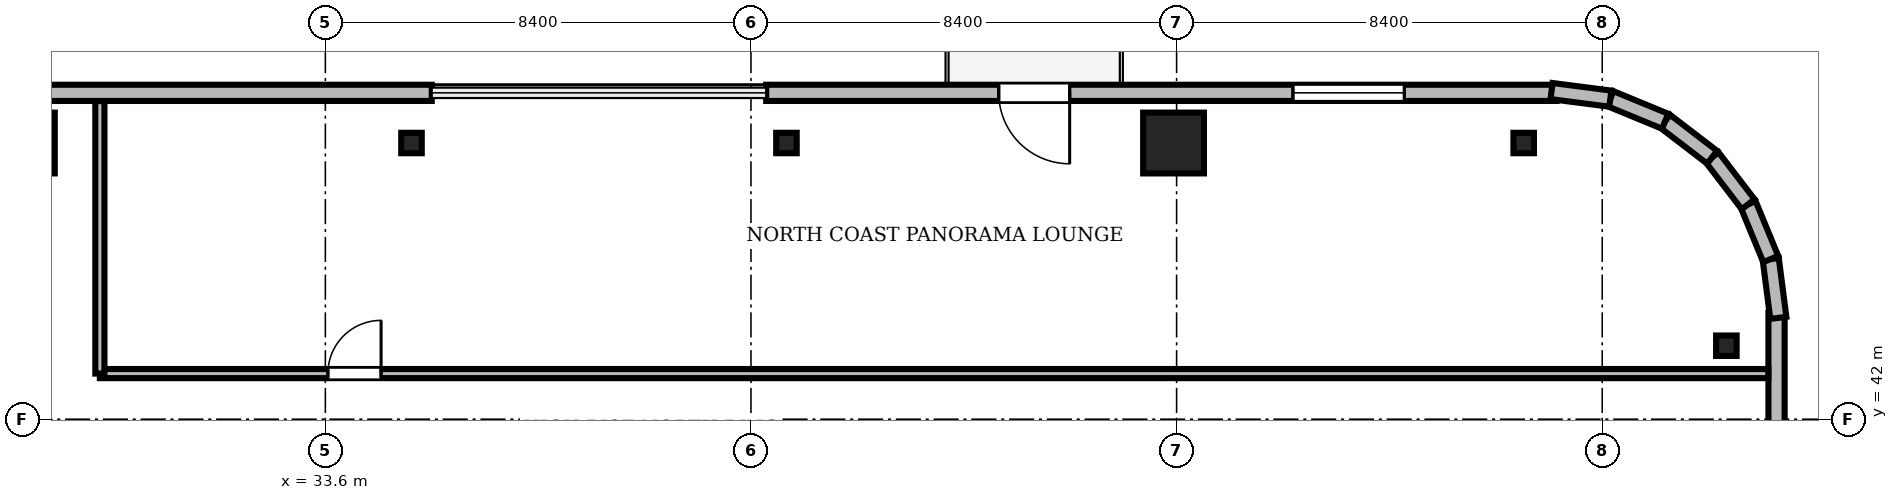
"""IFC4 building model, lengths in metres.
Left out: names, types, materials, properties, quantities, classifications, styles, units other than length and angle.
Written with IfcOpenShell. Run it as: python <this file> out.ifc"""

import sys

from ifc_helpers import new_model, si_unit, direction, frame, frame_2d, origin, origin_2d, place, context, subcontext, project, spatial, rectangle, i_section, extrude, source, transform, mapped, element, fill, save


model = new_model("IFC4")
c1 = context("Model", 3, precision=1e-05, world=origin(), true_north=direction((0.0, 1.0)))
c2 = subcontext(c1, "Body", "Model", "MODEL_VIEW")
j1 = project(units=[si_unit("LENGTHUNIT", "METRE"), si_unit("PLANEANGLEUNIT", "RADIAN")], contexts=[c1])
p1 = place(None, origin())
s1 = spatial("IfcSite", under=j1, at=p1, CompositionType="ELEMENT")
p2 = place(p1, origin())
s2 = spatial("IfcBuilding", under=s1, at=p2, CompositionType="ELEMENT")
p3 = place(p2, frame((0.0, 0.0, 246.65)))
s3 = spatial("IfcBuildingStorey", under=s2, at=p3, CompositionType="ELEMENT", Elevation=246.65)
m1 = source(origin(), c2, "Body", "SweptSolid", [
    extrude(rectangle(XDim=1.2, YDim=1.2, at=origin_2d()), origin(), (0.0, 0.0, 1.0), 3.73),
])
for number, where, z_axis, x_axis in (
    (1, (50.34, 47.45, 0.0), (0.0, 0.0, 1.0), (1.0, 0.0, 0.0)),
    (2, (27.66, 47.45, 0.0), (0.0, 0.0, 1.0), (1.0, 0.0, 0.0)),
):
    element("IfcColumn", number, at=place(p3, frame(where, z_axis=z_axis, x_axis=x_axis)), inside=s3, PredefinedType="COLUMN", context=c2, shape_type="MappedRepresentation", body=[
        mapped(m1, transform((0.0, 0.0, 0.0), scale=1.0)),
    ])
m2 = source(origin(), c2, "Body", "SweptSolid", [
    extrude(i_section(OverallWidth=0.405, OverallDepth=0.403, WebThickness=0.018, FlangeThickness=0.028, FilletRadius=0.015, at=origin_2d()), origin(), (0.0, 0.0, 1.0), 3.73),
])
for number, where, z_axis, x_axis in (
    (3, (61.25, 43.45, 0.0), (0.0, 0.0, 1.0), (1.0, 0.0, 0.0)),
    (4, (57.25, 47.45, 0.0), (0.0, 0.0, 1.0), (1.0, 0.0, 0.0)),
    (5, (42.7, 47.45, 0.0), (0.0, 0.0, 1.0), (1.0, 0.0, 0.0)),
    (6, (35.3, 47.45, 0.0), (0.0, 0.0, 1.0), (1.0, 0.0, 0.0)),
):
    element("IfcColumn", number, at=place(p3, frame(where, z_axis=z_axis, x_axis=x_axis)), inside=s3, PredefinedType="COLUMN", context=c2, shape_type="MappedRepresentation", body=[
        mapped(m2, transform((0.0, 0.0, 0.0), scale=1.0)),
    ])
m3 = source(origin(), c2, "Body", "SweptSolid", [
    extrude(rectangle(XDim=15.6, YDim=0.32, at=frame_2d((7.8, 0.0))), origin(), (0.0, 0.0, 1.0), 3.73),
])
p4 = place(p3, frame((57.9, 48.44, 0.0), z_axis=(0.0, 0.0, 1.0), x_axis=(-1.0, 0.0, 0.0)))
e7 = element("IfcWall", 7, at=p4, inside=s3, PredefinedType="SOLIDWALL", context=c2, shape_type="MappedRepresentation", body=[
    mapped(m3, transform((0.0, 0.0, 0.0), scale=1.0)),
])
m4 = source(origin(), c2, "Body", "SweptSolid", [
    extrude(rectangle(XDim=1.4, YDim=2.3, at=frame_2d((0.7, 1.15))), frame((0.0, 0.17, 0.0), z_axis=(0.0, -1.0, 0.0), x_axis=(1.0, 0.0, 0.0)), (0.0, 0.0, 1.0), 0.34),
])
p5 = place(p4, frame((9.61, 0.0, 0.0)))
e8 = element("IfcOpeningElement", 8, at=p5, cuts=e7, PredefinedType="OPENING", context=c2, shape_type="MappedRepresentation", body=[
    mapped(m4, transform((0.0, 0.0, 0.0), scale=1.0)),
])
m5 = source(origin(), c2, "Body", "SweptSolid", [
    extrude(rectangle(XDim=2.2, YDim=2.4, at=frame_2d((1.1, 1.2))), frame((0.0, 0.17, 0.0), z_axis=(0.0, -1.0, 0.0), x_axis=(1.0, 0.0, 0.0)), (0.0, 0.0, 1.0), 0.34),
])
p6 = place(p4, frame((3.005, 0.0, 0.72)))
e9 = element("IfcOpeningElement", 9, at=p6, cuts=e7, PredefinedType="OPENING", context=c2, shape_type="MappedRepresentation", body=[
    mapped(m5, transform((0.0, 0.0, 0.0), scale=1.0)),
])
p7 = place(p3, frame((35.7, 48.44, 0.0), z_axis=(0.0, 0.0, 1.0), x_axis=(-1.0, 0.0, 0.0)))
e10 = element("IfcWall", 10, at=p7, inside=s3, PredefinedType="SOLIDWALL", context=c2, shape_type="MappedRepresentation", body=[
    mapped(m3, transform((0.0, 0.0, 0.0), scale=1.0)),
])
p8 = place(p7, frame((10.395, 0.0, 0.72)))
e11 = element("IfcOpeningElement", 11, at=p8, cuts=e10, PredefinedType="OPENING", context=c2, shape_type="MappedRepresentation", body=[
    mapped(m5, transform((0.0, 0.0, 0.0), scale=1.0)),
])
m6 = source(origin(), c2, "Body", "SweptSolid", [
    extrude(rectangle(XDim=15.6, YDim=0.32, at=frame_2d((7.8, 0.0))), origin(), (0.0, 0.0, 1.0), 3.73),
])
p9 = place(p3, frame((62.24, 28.5, 0.0), z_axis=(0.0, 0.0, 1.0), x_axis=(0.0, 1.0, 0.0)))
e12 = element("IfcWall", 12, at=p9, inside=s3, PredefinedType="SOLIDWALL", context=c2, shape_type="MappedRepresentation", body=[
    mapped(m6, transform((0.0, 0.0, 0.0), scale=1.0)),
])
p10 = place(p9, frame((10.395, 0.0, 0.72)))
e13 = element("IfcOpeningElement", 13, at=p10, cuts=e12, PredefinedType="OPENING", context=c2, shape_type="MappedRepresentation", body=[
    mapped(m5, transform((0.0, 0.0, 0.0), scale=1.0)),
])
m7 = source(origin(), c2, "Body", "SweptSolid", [
    extrude(rectangle(XDim=1.17, YDim=0.32, at=frame_2d((0.585, 0.0))), origin(), (0.0, 0.0, 1.0), 3.73),
])
p11 = place(p3, frame((62.276, 44.0, 0.0), z_axis=(0.0, 0.0, 1.0), x_axis=(-0.128295670475, 0.991735963317, 0.0)))
e14 = element("IfcWall", 14, at=p11, inside=s3, PredefinedType="SOLIDWALL", context=c2, shape_type="MappedRepresentation", body=[
    mapped(m7, transform((0.0, 0.0, 0.0), scale=1.0)),
])
m8 = source(origin(), c2, "Body", "SweptSolid", [
    extrude(rectangle(XDim=1.169, YDim=0.32, at=frame_2d((0.584, 0.0))), origin(), (0.0, 0.0, 1.0), 3.73),
])
p12 = place(p3, frame((62.125, 45.16, 0.0), z_axis=(0.0, 0.0, 1.0), x_axis=(-0.381054331552, 0.924552646638, 0.0)))
e15 = element("IfcWall", 15, at=p12, inside=s3, PredefinedType="SOLIDWALL", context=c2, shape_type="MappedRepresentation", body=[
    mapped(m8, transform((0.0, 0.0, 0.0), scale=1.0)),
])
m9 = source(origin(), c2, "Body", "SweptSolid", [
    extrude(rectangle(XDim=1.169, YDim=0.32, at=frame_2d((0.584, 0.0))), origin(), (0.0, 0.0, 1.0), 3.73),
])
p13 = place(p3, frame((61.68, 46.241, 0.0), z_axis=(0.0, 0.0, 1.0), x_axis=(-0.608387696831, 0.793639975269, 0.0)))
e16 = element("IfcWall", 16, at=p13, inside=s3, PredefinedType="SOLIDWALL", context=c2, shape_type="MappedRepresentation", body=[
    mapped(m9, transform((0.0, 0.0, 0.0), scale=1.0)),
])
m10 = source(origin(), c2, "Body", "SweptSolid", [
    extrude(rectangle(XDim=1.169, YDim=0.32, at=frame_2d((0.584, 0.0))), origin(), (0.0, 0.0, 1.0), 3.73),
])
p14 = place(p3, frame((60.969, 47.169, 0.0), z_axis=(0.0, 0.0, 1.0), x_axis=(-0.793663520347, 0.608356981114, 0.0)))
e17 = element("IfcWall", 17, at=p14, inside=s3, PredefinedType="SOLIDWALL", context=c2, shape_type="MappedRepresentation", body=[
    mapped(m10, transform((0.0, 0.0, 0.0), scale=1.0)),
])
p15 = place(p3, frame((60.041, 47.88, 0.0), z_axis=(0.0, 0.0, 1.0), x_axis=(-0.924552646638, 0.381054331552, 0.0)))
e18 = element("IfcWall", 18, at=p15, inside=s3, PredefinedType="SOLIDWALL", context=c2, shape_type="MappedRepresentation", body=[
    mapped(m8, transform((0.0, 0.0, 0.0), scale=1.0)),
])
p16 = place(p3, frame((58.96, 48.325, 0.0), z_axis=(0.0, 0.0, 1.0), x_axis=(-0.991735963317, 0.128295670475, 0.0)))
e19 = element("IfcWall", 19, at=p16, inside=s3, PredefinedType="SOLIDWALL", context=c2, shape_type="MappedRepresentation", body=[
    mapped(m7, transform((0.0, 0.0, 0.0), scale=1.0)),
])
m11 = source(origin(), c2, "Body", "SweptSolid", [
    extrude(rectangle(XDim=32.928, YDim=0.18, at=frame_2d((16.464, 0.0))), origin(), (0.0, 0.0, 1.0), 2.972),
])
p17 = place(p3, frame((29.15, 42.9, 0.0), z_axis=(0.0, 0.0, 1.0), x_axis=(1.0, 0.0, 0.0)))
e20 = element("IfcWall", 20, at=p17, inside=s3, PredefinedType="PARTITIONING", context=c2, shape_type="MappedRepresentation", body=[
    mapped(m11, transform((0.0, 0.0, 0.0), scale=1.0)),
])
m12 = source(origin(), c2, "Body", "SweptSolid", [
    extrude(rectangle(XDim=1.05, YDim=2.2, at=frame_2d((0.525, 1.1))), frame((0.0, 0.1, 0.0), z_axis=(0.0, -1.0, 0.0), x_axis=(1.0, 0.0, 0.0)), (0.0, 0.0, 1.0), 0.2),
])
p18 = place(p17, frame((4.5, 0.0, 0.0)))
e21 = element("IfcOpeningElement", 21, at=p18, cuts=e20, PredefinedType="OPENING", context=c2, shape_type="MappedRepresentation", body=[
    mapped(m12, transform((0.0, 0.0, 0.0), scale=1.0)),
])
m13 = source(origin(), c2, "Body", "SweptSolid", [
    extrude(rectangle(XDim=5.378, YDim=0.18, at=frame_2d((2.689, 0.0))), origin(), (0.0, 0.0, 1.0), 2.972),
])
p19 = place(p3, frame((29.15, 42.9, 0.0), z_axis=(0.0, 0.0, 1.0), x_axis=(0.0, 1.0, 0.0)))
e22 = element("IfcWall", 22, at=p19, inside=s3, PredefinedType="PARTITIONING", context=c2, shape_type="MappedRepresentation", body=[
    mapped(m13, transform((0.0, 0.0, 0.0), scale=1.0)),
])
m14 = source(origin(), c2, "Body", "SweptSolid", [
    extrude(rectangle(XDim=1.4, YDim=2.3, at=frame_2d((0.7, 1.15))), frame((0.0, 0.025, 0.0), z_axis=(0.0, -1.0, 0.0), x_axis=(1.0, 0.0, 0.0)), (0.0, 0.0, 1.0), 0.05),
])
p20 = place(p5, frame((1.4, 0.0, 0.0), z_axis=(0.0, 0.0, 1.0), x_axis=(-1.0, 0.0, 0.0)))
e23 = element("IfcDoor", 23, at=p20, inside=s3, OperationType="DOUBLE_DOOR_SLIDING", PredefinedType="DOOR", context=c2, shape_type="MappedRepresentation", body=[
    mapped(m14, transform((0.0, 0.0, 0.0), scale=1.0)),
])
fill(e8, e23)
m15 = source(origin(), c2, "Body", "SweptSolid", [
    extrude(rectangle(XDim=2.2, YDim=2.4, at=frame_2d((1.1, 1.2))), frame((0.0, 0.03, 0.0), z_axis=(0.0, -1.0, 0.0), x_axis=(1.0, 0.0, 0.0)), (0.0, 0.0, 1.0), 0.06),
])
p21 = place(p6, origin())
e24 = element("IfcWindow", 24, at=p21, inside=s3, PartitioningType="SINGLE_PANEL", PredefinedType="WINDOW", context=c2, shape_type="MappedRepresentation", body=[
    mapped(m15, transform((0.0, 0.0, 0.0), scale=1.0)),
])
fill(e9, e24)
m16 = source(origin(), c2, "Body", "SweptSolid", [
    extrude(rectangle(XDim=1.05, YDim=2.2, at=frame_2d((0.525, 1.1))), frame((0.0, 0.025, 0.0), z_axis=(0.0, -1.0, 0.0), x_axis=(1.0, 0.0, 0.0)), (0.0, 0.0, 1.0), 0.05),
])
p22 = place(p18, origin())
e25 = element("IfcDoor", 25, at=p22, inside=s3, OperationType="SINGLE_SWING_RIGHT", PredefinedType="DOOR", context=c2, shape_type="MappedRepresentation", body=[
    mapped(m16, transform((0.0, 0.0, 0.0), scale=1.0)),
])
fill(e21, e25)
save(model, sys.argv[1])
